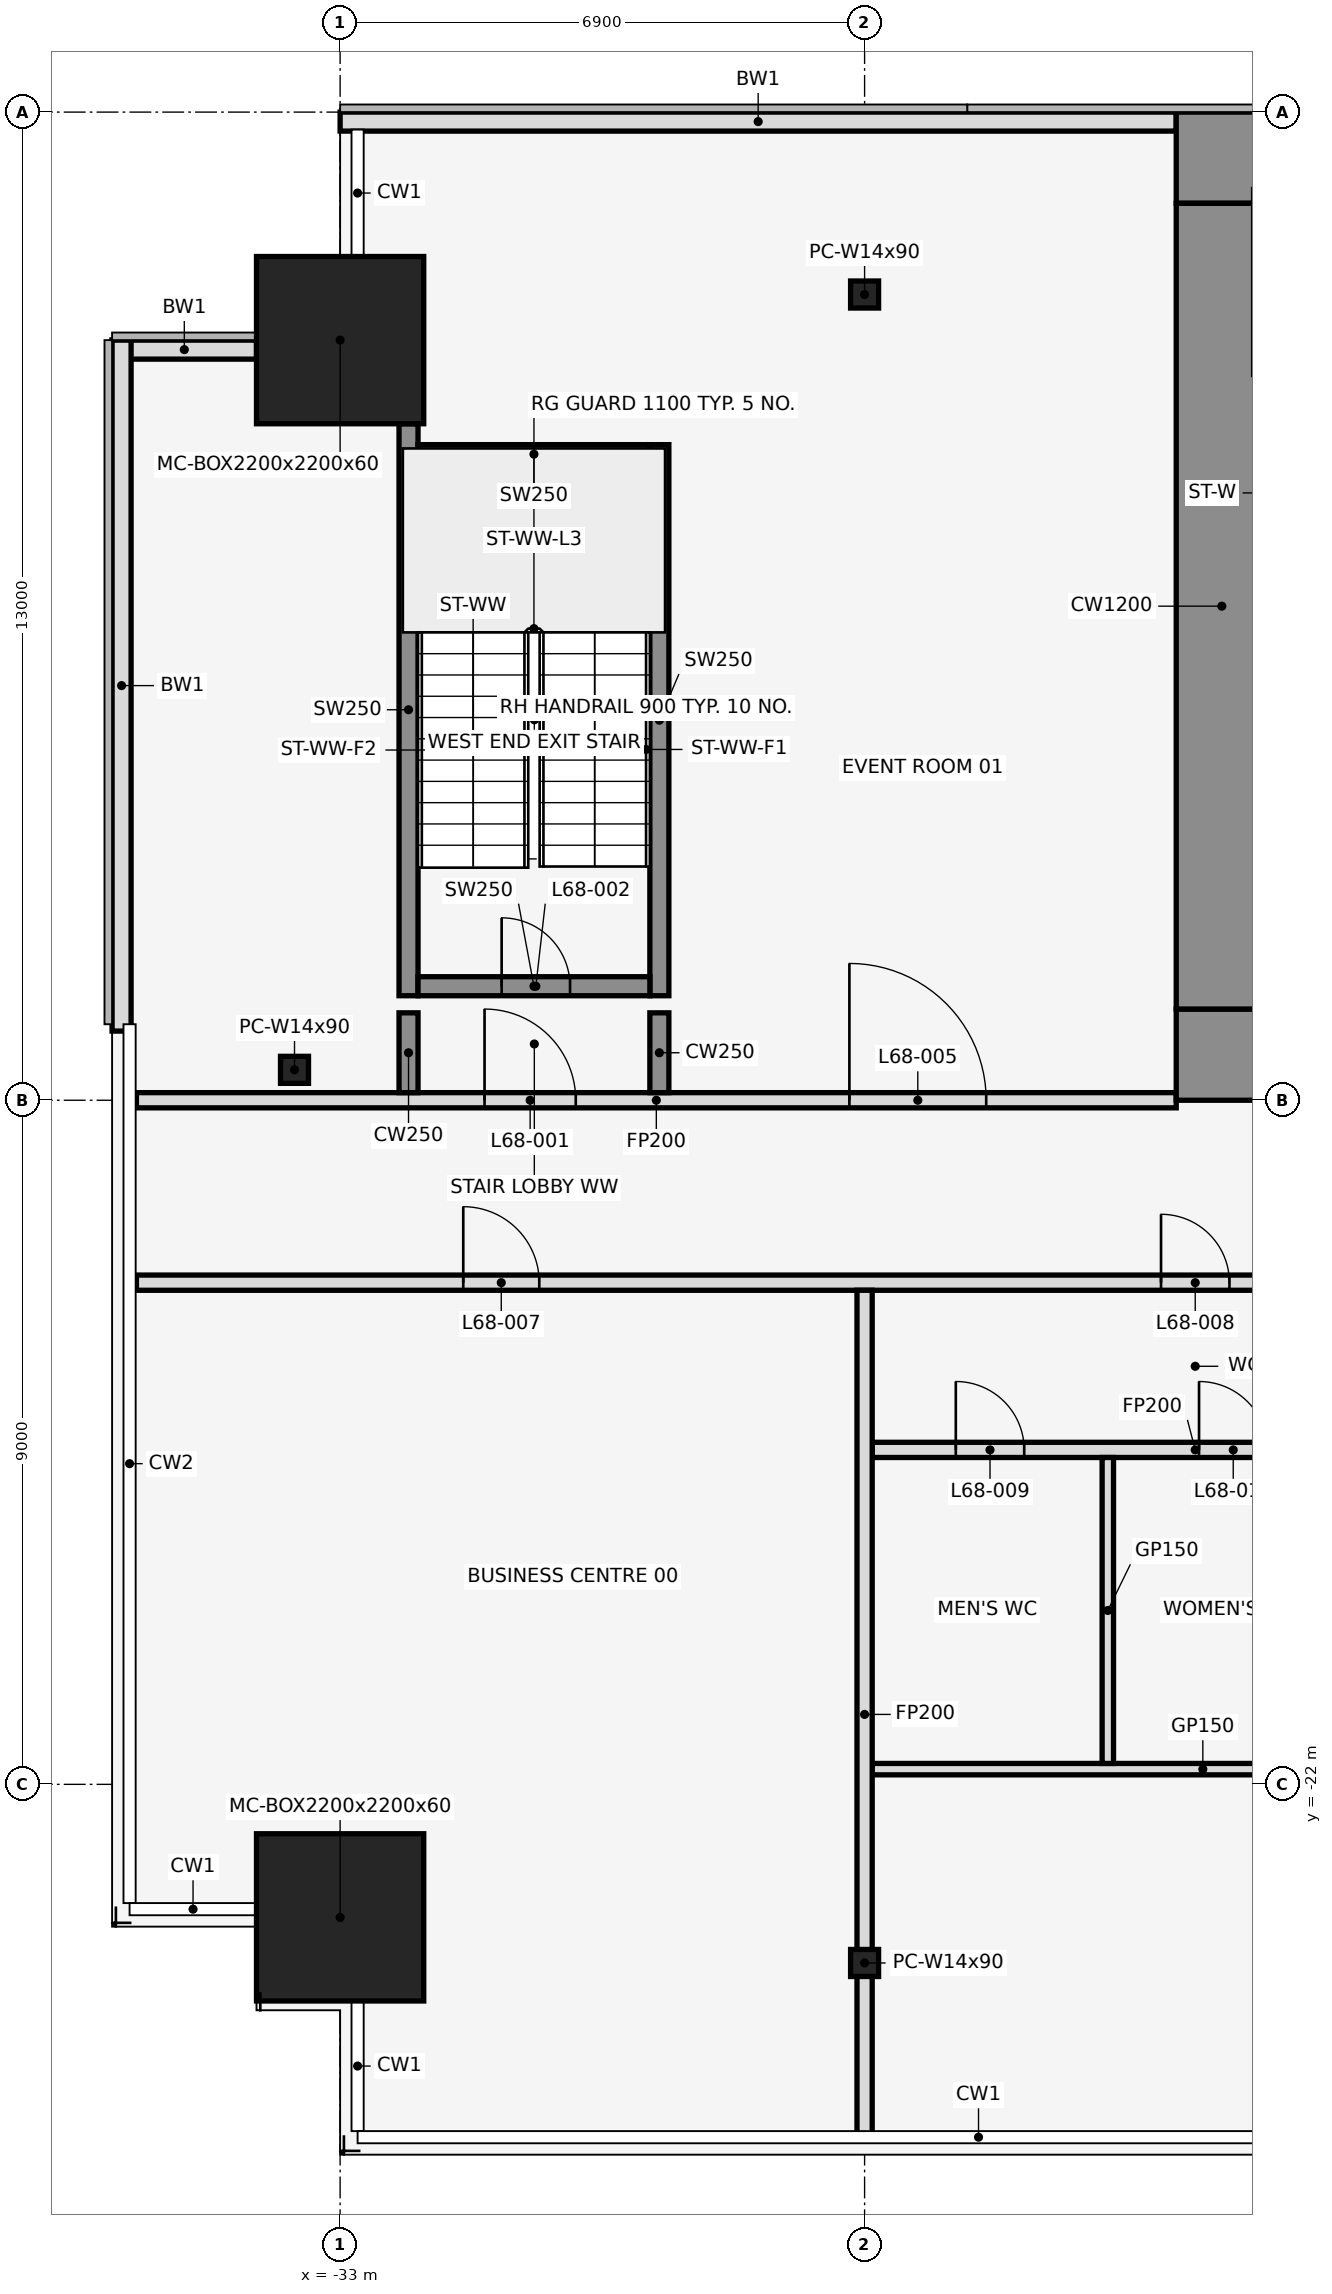
"""IFC4 building model, lengths in metres.
Left out: names, types, materials, properties, quantities, classifications, styles, units other than length and angle.
Written with IfcOpenShell. Run it as: python <this file> out.ifc"""

import sys

from ifc_helpers import new_model, si_unit, direction, frame, frame_2d, origin, origin_2d, place, context, subcontext, project, spatial, rectangle, hollow_rectangle, i_section, extrude, element, fill, save


model = new_model("IFC4")
c1 = context("Model", 3, precision=1e-05, world=origin(), true_north=direction((0.0, 1.0)))
c2 = subcontext(c1, "Body", "Model", "MODEL_VIEW")
j1 = project(units=[si_unit("LENGTHUNIT", "METRE"), si_unit("PLANEANGLEUNIT", "RADIAN")], contexts=[c1])
p1 = place(None, origin())
s1 = spatial("IfcSite", under=j1, at=p1, CompositionType="ELEMENT")
p2 = place(p1, origin())
s2 = spatial("IfcBuilding", under=s1, at=p2, CompositionType="ELEMENT")
p3 = place(p2, frame((0.0, 0.0, 302.0)))
s3 = spatial("IfcBuildingStorey", under=s2, at=p3, CompositionType="ELEMENT", Elevation=302.0)
for number, where, z_axis, x_axis in (
    (1, (-33.0, -23.75, 0.0), (0.0, 0.0, 1.0), (1.0, 0.0, 0.0)),
    (2, (-33.0, -3.0, 0.0), (0.0, 0.0, 1.0), (1.0, 0.0, 0.0)),
):
    element("IfcColumn", number, at=place(p3, frame(where, z_axis=z_axis, x_axis=x_axis)), inside=s3, PredefinedType="COLUMN", context=c2, shape_type="SweptSolid", body=[
        extrude(hollow_rectangle(XDim=2.2, YDim=2.2, WallThickness=0.06, at=origin_2d()), origin(), (0.0, 0.0, 1.0), 4.5),
    ])
for number, where, z_axis, x_axis in (
    (3, (-26.1, -24.35, 0.0), (0.0, 0.0, 1.0), (1.0, 0.0, 0.0)),
    (4, (-26.1, -2.4, 0.0), (0.0, 0.0, 1.0), (1.0, 0.0, 0.0)),
    (5, (-33.6, -12.6, 0.0), (0.0, 0.0, 1.0), (1.0, 0.0, 0.0)),
):
    element("IfcColumn", number, at=place(p3, frame(where, z_axis=z_axis, x_axis=x_axis)), inside=s3, PredefinedType="COLUMN", context=c2, shape_type="SweptSolid", body=[
        extrude(i_section(OverallWidth=0.368, OverallDepth=0.356, WebThickness=0.011, FlangeThickness=0.018, at=origin_2d()), origin(), (0.0, 0.0, 1.0), 4.5),
    ])
p4 = place(p3, frame((-22.0, -0.125, 0.0), z_axis=(0.0, 0.0, 1.0), x_axis=(-1.0, 0.0, 0.0)))
e6 = element("IfcWall", 6, at=p4, inside=s3, PredefinedType="STANDARD", context=c2, shape_type="SweptSolid", body=[
    extrude(rectangle(XDim=11.0, YDim=0.25, at=frame_2d((5.5, 0.0))), origin(), (0.0, 0.0, 1.0), 4.35),
])
p5 = place(p3, frame((-34.1, -3.125, 0.0), z_axis=(0.0, 0.0, 1.0), x_axis=(-1.0, 0.0, 0.0)))
e7 = element("IfcWall", 7, at=p5, inside=s3, PredefinedType="STANDARD", context=c2, shape_type="SweptSolid", body=[
    extrude(rectangle(XDim=1.9, YDim=0.25, at=frame_2d((0.95, 0.0))), origin(), (0.0, 0.0, 1.0), 4.35),
])
p6 = place(p3, frame((-35.875, -3.0, 0.0), z_axis=(0.0, 0.0, 1.0), x_axis=(0.0, -1.0, 0.0)))
e8 = element("IfcWall", 8, at=p6, inside=s3, PredefinedType="STANDARD", context=c2, shape_type="SweptSolid", body=[
    extrude(rectangle(XDim=9.09, YDim=0.25, at=frame_2d((4.545, 0.0))), origin(), (0.0, 0.0, 1.0), 4.35),
])
p7 = place(p3, frame((-32.1, -11.625, 0.0), z_axis=(0.0, 0.0, 1.0), x_axis=(0.0, 1.0, 0.0)))
e9 = element("IfcWall", 9, at=p7, inside=s3, PredefinedType="SHEAR", context=c2, shape_type="SweptSolid", body=[
    extrude(rectangle(XDim=7.525, YDim=0.25, at=frame_2d((3.762, 0.0))), origin(), (0.0, 0.0, 1.0), 4.5),
])
p8 = place(p3, frame((-28.8, -11.625, 0.0), z_axis=(0.0, 0.0, 1.0), x_axis=(0.0, 1.0, 0.0)))
e10 = element("IfcWall", 10, at=p8, inside=s3, PredefinedType="SHEAR", context=c2, shape_type="SweptSolid", body=[
    extrude(rectangle(XDim=7.25, YDim=0.25, at=frame_2d((3.625, 0.0))), origin(), (0.0, 0.0, 1.0), 4.5),
])
p9 = place(p3, frame((-31.975, -11.5, 0.0), z_axis=(0.0, 0.0, 1.0), x_axis=(1.0, 0.0, 0.0)))
e11 = element("IfcWall", 11, at=p9, inside=s3, PredefinedType="SHEAR", context=c2, shape_type="SweptSolid", body=[
    extrude(rectangle(XDim=3.05, YDim=0.25, at=frame_2d((1.525, 0.0))), origin(), (0.0, 0.0, 1.0), 4.5),
])
p10 = place(p9, frame((1.1, 0.0, 0.0)))
e12 = element("IfcOpeningElement", 12, at=p10, cuts=e11, PredefinedType="OPENING", context=c2, shape_type="SweptSolid", body=[
    extrude(rectangle(XDim=0.9, YDim=2.1, at=frame_2d((0.45, 1.05))), frame((0.0, 0.137, 0.0), z_axis=(0.0, -1.0, 0.0), x_axis=(1.0, 0.0, 0.0)), (0.0, 0.0, 1.0), 0.274),
])
p11 = place(p3, frame((-31.975, -4.5, 0.0), z_axis=(0.0, 0.0, 1.0), x_axis=(1.0, 0.0, 0.0)))
e13 = element("IfcWall", 13, at=p11, inside=s3, PredefinedType="SHEAR", context=c2, shape_type="SweptSolid", body=[
    extrude(rectangle(XDim=3.05, YDim=0.25, at=frame_2d((1.525, 0.0))), origin(), (0.0, 0.0, 1.0), 4.5),
])
p12 = place(p3, frame((-26.0, -21.8, 0.0), z_axis=(0.0, 0.0, 1.0), x_axis=(1.0, 0.0, 0.0)))
e14 = element("IfcWall", 14, at=p12, inside=s3, PredefinedType="PARTITIONING", context=c2, shape_type="SweptSolid", body=[
    extrude(rectangle(XDim=8.7, YDim=0.15, at=frame_2d((4.35, 0.0))), origin(), (0.0, 0.0, 1.0), 3.418),
])
p13 = place(p3, frame((-26.0, -17.6, 0.0), z_axis=(0.0, 0.0, 1.0), x_axis=(1.0, 0.0, 0.0)))
e15 = element("IfcWall", 15, at=p13, inside=s3, PredefinedType="PARTITIONING", context=c2, shape_type="SweptSolid", body=[
    extrude(rectangle(XDim=8.5, YDim=0.2, at=frame_2d((4.25, 0.0))), origin(), (0.0, 0.0, 1.0), 3.418),
])
p14 = place(p13, frame((1.1, 0.0, 0.0)))
e16 = element("IfcOpeningElement", 16, at=p14, cuts=e15, PredefinedType="OPENING", context=c2, shape_type="SweptSolid", body=[
    extrude(rectangle(XDim=0.9, YDim=2.1, at=frame_2d((0.45, 1.05))), frame((0.0, 0.112, 0.0), z_axis=(0.0, -1.0, 0.0), x_axis=(1.0, 0.0, 0.0)), (0.0, 0.0, 1.0), 0.224),
])
p15 = place(p13, frame((4.3, 0.0, 0.0)))
e17 = element("IfcOpeningElement", 17, at=p15, cuts=e15, PredefinedType="OPENING", context=c2, shape_type="SweptSolid", body=[
    extrude(rectangle(XDim=0.9, YDim=2.1, at=frame_2d((0.45, 1.05))), frame((0.0, 0.112, 0.0), z_axis=(0.0, -1.0, 0.0), x_axis=(1.0, 0.0, 0.0)), (0.0, 0.0, 1.0), 0.224),
])
p16 = place(p13, frame((6.9, 0.0, 0.0)))
e18 = element("IfcOpeningElement", 18, at=p16, cuts=e15, PredefinedType="OPENING", context=c2, shape_type="SweptSolid", body=[
    extrude(rectangle(XDim=1.0, YDim=2.1, at=frame_2d((0.5, 1.05))), frame((0.0, 0.112, 0.0), z_axis=(0.0, -1.0, 0.0), x_axis=(1.0, 0.0, 0.0)), (0.0, 0.0, 1.0), 0.224),
])
p17 = place(p3, frame((-35.68, -15.4, 0.0), z_axis=(0.0, 0.0, 1.0), x_axis=(1.0, 0.0, 0.0)))
e19 = element("IfcWall", 19, at=p17, inside=s3, PredefinedType="PARTITIONING", context=c2, shape_type="SweptSolid", body=[
    extrude(rectangle(XDim=34.28, YDim=0.2, at=frame_2d((17.14, 0.0))), origin(), (0.0, 0.0, 1.0), 3.418),
])
p18 = place(p17, frame((4.3, 0.0, 0.0)))
e20 = element("IfcOpeningElement", 20, at=p18, cuts=e19, PredefinedType="OPENING", context=c2, shape_type="SweptSolid", body=[
    extrude(rectangle(XDim=1.0, YDim=2.1, at=frame_2d((0.5, 1.05))), frame((0.0, 0.112, 0.0), z_axis=(0.0, -1.0, 0.0), x_axis=(1.0, 0.0, 0.0)), (0.0, 0.0, 1.0), 0.224),
])
p19 = place(p17, frame((13.48, 0.0, 0.0)))
e21 = element("IfcOpeningElement", 21, at=p19, cuts=e19, PredefinedType="OPENING", context=c2, shape_type="SweptSolid", body=[
    extrude(rectangle(XDim=0.9, YDim=2.1, at=frame_2d((0.45, 1.05))), frame((0.0, 0.112, 0.0), z_axis=(0.0, -1.0, 0.0), x_axis=(1.0, 0.0, 0.0)), (0.0, 0.0, 1.0), 0.224),
])
p20 = place(p17, frame((21.68, 0.0, 0.0)))
e22 = element("IfcOpeningElement", 22, at=p20, cuts=e19, PredefinedType="OPENING", context=c2, shape_type="SweptSolid", body=[
    extrude(rectangle(XDim=1.8, YDim=2.1, at=frame_2d((0.9, 1.05))), frame((0.0, 0.112, 0.0), z_axis=(0.0, -1.0, 0.0), x_axis=(1.0, 0.0, 0.0)), (0.0, 0.0, 1.0), 0.224),
])
p21 = place(p3, frame((-35.68, -13.0, 0.0), z_axis=(0.0, 0.0, 1.0), x_axis=(1.0, 0.0, 0.0)))
e23 = element("IfcWall", 23, at=p21, inside=s3, PredefinedType="PARTITIONING", context=c2, shape_type="SweptSolid", body=[
    extrude(rectangle(XDim=13.68, YDim=0.2, at=frame_2d((6.84, 0.0))), origin(), (0.0, 0.0, 1.0), 3.418),
])
p22 = place(p21, frame((4.58, 0.0, 0.0)))
e24 = element("IfcOpeningElement", 24, at=p22, cuts=e23, PredefinedType="OPENING", context=c2, shape_type="SweptSolid", body=[
    extrude(rectangle(XDim=1.2, YDim=2.1, at=frame_2d((0.6, 1.05))), frame((0.0, 0.112, 0.0), z_axis=(0.0, -1.0, 0.0), x_axis=(1.0, 0.0, 0.0)), (0.0, 0.0, 1.0), 0.224),
])
p23 = place(p21, frame((9.38, 0.0, 0.0)))
e25 = element("IfcOpeningElement", 25, at=p23, cuts=e23, PredefinedType="OPENING", context=c2, shape_type="SweptSolid", body=[
    extrude(rectangle(XDim=1.8, YDim=2.1, at=frame_2d((0.9, 1.05))), frame((0.0, 0.112, 0.0), z_axis=(0.0, -1.0, 0.0), x_axis=(1.0, 0.0, 0.0)), (0.0, 0.0, 1.0), 0.224),
])
for number, where, z_axis, x_axis in (
    (26, (-32.1, -12.9, 0.0), (0.0, 0.0, 1.0), (0.0, 1.0, 0.0)),
    (27, (-28.8, -12.9, 0.0), (0.0, 0.0, 1.0), (0.0, 1.0, 0.0)),
):
    element("IfcWall", number, at=place(p3, frame(where, z_axis=z_axis, x_axis=x_axis)), inside=s3, PredefinedType="SHEAR", context=c2, shape_type="SweptSolid", body=[
        extrude(rectangle(XDim=1.05, YDim=0.25, at=frame_2d((0.525, 0.0))), origin(), (0.0, 0.0, 1.0), 4.5),
    ])
p24 = place(p3, frame((-26.1, -26.66, 0.0), z_axis=(0.0, 0.0, 1.0), x_axis=(0.0, 1.0, 0.0)))
e28 = element("IfcWall", 28, at=p24, inside=s3, PredefinedType="PARTITIONING", context=c2, shape_type="SweptSolid", body=[
    extrude(rectangle(XDim=11.16, YDim=0.2, at=frame_2d((5.58, 0.0))), origin(), (0.0, 0.0, 1.0), 3.418),
])
p25 = place(p3, frame((-22.9, -21.725, 0.0), z_axis=(0.0, 0.0, 1.0), x_axis=(0.0, 1.0, 0.0)))
e29 = element("IfcWall", 29, at=p25, inside=s3, PredefinedType="PARTITIONING", context=c2, shape_type="SweptSolid", body=[
    extrude(rectangle(XDim=4.025, YDim=0.15, at=frame_2d((2.013, 0.0))), origin(), (0.0, 0.0, 1.0), 3.418),
])
p26 = place(p3, frame((-22.0, -0.6, 0.0), z_axis=(0.0, 0.0, 1.0), x_axis=(1.0, 0.0, 0.0)))
e30 = element("IfcWall", 30, at=p26, inside=s3, PredefinedType="SHEAR", context=c2, shape_type="SweptSolid", body=[
    extrude(rectangle(XDim=44.0, YDim=1.2, at=frame_2d((22.0, 0.0))), origin(), (0.0, 0.0, 1.0), 4.5),
])
p27 = place(p26, frame((18.55, 0.0, 0.0)))
e31 = element("IfcOpeningElement", 31, at=p27, cuts=e30, PredefinedType="OPENING", context=c2, shape_type="SweptSolid", body=[
    extrude(rectangle(XDim=0.9, YDim=2.1, at=frame_2d((0.45, 1.05))), frame((0.0, 0.612, 0.0), z_axis=(0.0, -1.0, 0.0), x_axis=(1.0, 0.0, 0.0)), (0.0, 0.0, 1.0), 1.224),
])
p28 = place(p26, frame((24.55, 0.0, 0.0)))
e32 = element("IfcOpeningElement", 32, at=p28, cuts=e30, PredefinedType="OPENING", context=c2, shape_type="SweptSolid", body=[
    extrude(rectangle(XDim=0.9, YDim=2.1, at=frame_2d((0.45, 1.05))), frame((0.0, 0.612, 0.0), z_axis=(0.0, -1.0, 0.0), x_axis=(1.0, 0.0, 0.0)), (0.0, 0.0, 1.0), 1.224),
])
p29 = place(p3, frame((-22.0, -12.4, 0.0), z_axis=(0.0, 0.0, 1.0), x_axis=(1.0, 0.0, 0.0)))
e33 = element("IfcWall", 33, at=p29, inside=s3, PredefinedType="SHEAR", context=c2, shape_type="SweptSolid", body=[
    extrude(rectangle(XDim=44.0, YDim=1.2, at=frame_2d((22.0, 0.0))), origin(), (0.0, 0.0, 1.0), 4.5),
])
p30 = place(p29, frame((2.2, 0.0, 0.0)))
e34 = element("IfcOpeningElement", 34, at=p30, cuts=e33, PredefinedType="OPENING", context=c2, shape_type="SweptSolid", body=[
    extrude(rectangle(XDim=1.2, YDim=2.1, at=frame_2d((0.6, 1.05))), frame((0.0, 0.612, 0.0), z_axis=(0.0, -1.0, 0.0), x_axis=(1.0, 0.0, 0.0)), (0.0, 0.0, 1.0), 1.224),
])
p31 = place(p29, frame((21.4, 0.0, 0.0)))
e35 = element("IfcOpeningElement", 35, at=p31, cuts=e33, PredefinedType="OPENING", context=c2, shape_type="SweptSolid", body=[
    extrude(rectangle(XDim=1.2, YDim=2.1, at=frame_2d((0.6, 1.05))), frame((0.0, 0.612, 0.0), z_axis=(0.0, -1.0, 0.0), x_axis=(1.0, 0.0, 0.0)), (0.0, 0.0, 1.0), 1.224),
])
p32 = place(p29, frame((40.6, 0.0, 0.0)))
e36 = element("IfcOpeningElement", 36, at=p32, cuts=e33, PredefinedType="OPENING", context=c2, shape_type="SweptSolid", body=[
    extrude(rectangle(XDim=1.2, YDim=2.1, at=frame_2d((0.6, 1.05))), frame((0.0, 0.612, 0.0), z_axis=(0.0, -1.0, 0.0), x_axis=(1.0, 0.0, 0.0)), (0.0, 0.0, 1.0), 1.224),
])
p33 = place(p29, frame((16.0, 0.0, 0.0)))
e37 = element("IfcOpeningElement", 37, at=p33, cuts=e33, PredefinedType="OPENING", context=c2, shape_type="SweptSolid", body=[
    extrude(rectangle(XDim=1.8, YDim=2.1, at=frame_2d((0.9, 1.05))), frame((0.0, 0.612, 0.0), z_axis=(0.0, -1.0, 0.0), x_axis=(1.0, 0.0, 0.0)), (0.0, 0.0, 1.0), 1.224),
])
p34 = place(p29, frame((6.3, 0.0, 0.0)))
e38 = element("IfcOpeningElement", 38, at=p34, cuts=e33, PredefinedType="OPENING", context=c2, shape_type="SweptSolid", body=[
    extrude(rectangle(XDim=1.2, YDim=2.1, at=frame_2d((0.6, 1.05))), frame((0.0, 0.612, 0.0), z_axis=(0.0, -1.0, 0.0), x_axis=(1.0, 0.0, 0.0)), (0.0, 0.0, 1.0), 1.224),
])
p35 = place(p29, frame((26.2, 0.0, 0.0)))
e39 = element("IfcOpeningElement", 39, at=p35, cuts=e33, PredefinedType="OPENING", context=c2, shape_type="SweptSolid", body=[
    extrude(rectangle(XDim=1.8, YDim=2.1, at=frame_2d((0.9, 1.05))), frame((0.0, 0.612, 0.0), z_axis=(0.0, -1.0, 0.0), x_axis=(1.0, 0.0, 0.0)), (0.0, 0.0, 1.0), 1.224),
])
p36 = place(p29, frame((36.5, 0.0, 0.0)))
e40 = element("IfcOpeningElement", 40, at=p36, cuts=e33, PredefinedType="OPENING", context=c2, shape_type="SweptSolid", body=[
    extrude(rectangle(XDim=1.2, YDim=2.1, at=frame_2d((0.6, 1.05))), frame((0.0, 0.612, 0.0), z_axis=(0.0, -1.0, 0.0), x_axis=(1.0, 0.0, 0.0)), (0.0, 0.0, 1.0), 1.224),
])
p37 = place(p3, frame((-21.4, -11.8, 0.0), z_axis=(0.0, 0.0, 1.0), x_axis=(0.0, 1.0, 0.0)))
e41 = element("IfcWall", 41, at=p37, inside=s3, PredefinedType="SHEAR", context=c2, shape_type="SweptSolid", body=[
    extrude(rectangle(XDim=10.6, YDim=1.2, at=frame_2d((5.3, 0.0))), origin(), (0.0, 0.0, 1.0), 4.5),
])
p38 = place(p22, origin())
e42 = element("IfcDoor", 42, at=p38, inside=s3, OperationType="SINGLE_SWING_LEFT", PredefinedType="DOOR", context=c2, shape_type="SweptSolid", body=[
    extrude(rectangle(XDim=1.2, YDim=2.1, at=frame_2d((0.6, 1.05))), frame((0.0, 0.025, 0.0), z_axis=(0.0, -1.0, 0.0), x_axis=(1.0, 0.0, 0.0)), (0.0, 0.0, 1.0), 0.05),
])
fill(e24, e42)
p39 = place(p10, origin())
e43 = element("IfcDoor", 43, at=p39, inside=s3, OperationType="SINGLE_SWING_LEFT", PredefinedType="DOOR", context=c2, shape_type="SweptSolid", body=[
    extrude(rectangle(XDim=0.9, YDim=2.1, at=frame_2d((0.45, 1.05))), frame((0.0, 0.025, 0.0), z_axis=(0.0, -1.0, 0.0), x_axis=(1.0, 0.0, 0.0)), (0.0, 0.0, 1.0), 0.05),
])
fill(e12, e43)
p40 = place(p23, origin())
e44 = element("IfcDoor", 44, at=p40, inside=s3, OperationType="SINGLE_SWING_LEFT", PredefinedType="DOOR", context=c2, shape_type="SweptSolid", body=[
    extrude(rectangle(XDim=1.8, YDim=2.1, at=frame_2d((0.9, 1.05))), frame((0.0, 0.025, 0.0), z_axis=(0.0, -1.0, 0.0), x_axis=(1.0, 0.0, 0.0)), (0.0, 0.0, 1.0), 0.05),
])
fill(e25, e44)
p41 = place(p18, frame((1.0, 0.0, 0.0), z_axis=(0.0, 0.0, 1.0), x_axis=(-1.0, 0.0, 0.0)))
e45 = element("IfcDoor", 45, at=p41, inside=s3, OperationType="SINGLE_SWING_LEFT", PredefinedType="DOOR", context=c2, shape_type="SweptSolid", body=[
    extrude(rectangle(XDim=1.0, YDim=2.1, at=frame_2d((0.5, 1.05))), frame((0.0, 0.025, 0.0), z_axis=(0.0, -1.0, 0.0), x_axis=(1.0, 0.0, 0.0)), (0.0, 0.0, 1.0), 0.05),
])
fill(e20, e45)
p42 = place(p19, frame((0.9, 0.0, 0.0), z_axis=(0.0, 0.0, 1.0), x_axis=(-1.0, 0.0, 0.0)))
e46 = element("IfcDoor", 46, at=p42, inside=s3, OperationType="SINGLE_SWING_RIGHT", PredefinedType="DOOR", context=c2, shape_type="SweptSolid", body=[
    extrude(rectangle(XDim=0.9, YDim=2.1, at=frame_2d((0.45, 1.05))), frame((0.0, 0.025, 0.0), z_axis=(0.0, -1.0, 0.0), x_axis=(1.0, 0.0, 0.0)), (0.0, 0.0, 1.0), 0.05),
])
fill(e21, e46)
p43 = place(p14, frame((0.9, 0.0, 0.0), z_axis=(0.0, 0.0, 1.0), x_axis=(-1.0, 0.0, 0.0)))
e47 = element("IfcDoor", 47, at=p43, inside=s3, OperationType="SINGLE_SWING_RIGHT", PredefinedType="DOOR", context=c2, shape_type="SweptSolid", body=[
    extrude(rectangle(XDim=0.9, YDim=2.1, at=frame_2d((0.45, 1.05))), frame((0.0, 0.025, 0.0), z_axis=(0.0, -1.0, 0.0), x_axis=(1.0, 0.0, 0.0)), (0.0, 0.0, 1.0), 0.05),
])
fill(e16, e47)
p44 = place(p15, frame((0.9, 0.0, 0.0), z_axis=(0.0, 0.0, 1.0), x_axis=(-1.0, 0.0, 0.0)))
e48 = element("IfcDoor", 48, at=p44, inside=s3, OperationType="SINGLE_SWING_LEFT", PredefinedType="DOOR", context=c2, shape_type="SweptSolid", body=[
    extrude(rectangle(XDim=0.9, YDim=2.1, at=frame_2d((0.45, 1.05))), frame((0.0, 0.025, 0.0), z_axis=(0.0, -1.0, 0.0), x_axis=(1.0, 0.0, 0.0)), (0.0, 0.0, 1.0), 0.05),
])
fill(e17, e48)
save(model, sys.argv[1])
